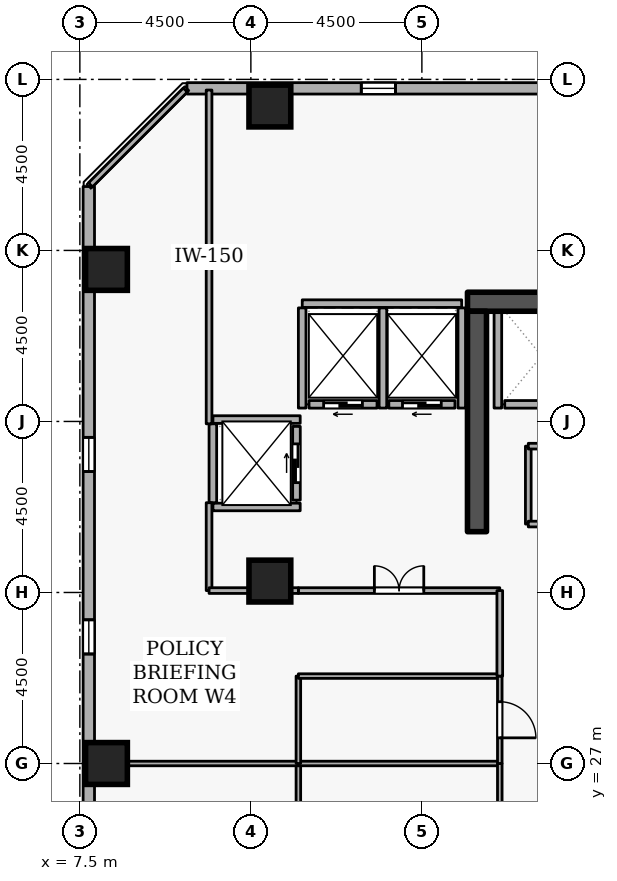
"""IFC4 building model, lengths in metres.
Left out: names, types, materials, properties, quantities, classifications, styles, units other than length and angle.
Written with IfcOpenShell. Run it as: python <this file> out.ifc"""

import sys

from ifc_helpers import new_model, si_unit, direction, frame, frame_2d, origin, origin_2d, place, context, subcontext, project, spatial, rectangle, extrude, element, fill, save


model = new_model("IFC4")
c1 = context("Model", 3, precision=1e-05, world=origin(), true_north=direction((0.0, 1.0)))
c2 = subcontext(c1, "Body", "Model", "MODEL_VIEW")
j1 = project(units=[si_unit("LENGTHUNIT", "METRE"), si_unit("PLANEANGLEUNIT", "RADIAN")], contexts=[c1])
p1 = place(None, origin())
s1 = spatial("IfcSite", under=j1, at=p1, CompositionType="ELEMENT")
p2 = place(p1, origin())
s2 = spatial("IfcBuilding", under=s1, at=p2, CompositionType="ELEMENT")
p3 = place(p2, frame((0.0, 0.0, 167.1)))
s3 = spatial("IfcBuildingStorey", under=s2, at=p3, CompositionType="ELEMENT", Elevation=167.1)
p4 = place(p3, frame((17.7, 39.15, 0.0), z_axis=(0.0, 0.0, 1.0), x_axis=(1.0, 0.0, 0.0)))
e1 = element("IfcWall", 1, at=p4, inside=s3, PredefinedType="SHEAR", context=c2, shape_type="SweptSolid", body=[
    extrude(rectangle(XDim=15.6, YDim=0.5, at=frame_2d((7.8, 0.0))), origin(), (0.0, 0.0, 1.0), 3.6),
])
p5 = place(p3, frame((17.95, 33.1, 0.0), z_axis=(0.0, 0.0, 1.0), x_axis=(0.0, 1.0, 0.0)))
e2 = element("IfcWall", 2, at=p5, inside=s3, PredefinedType="SHEAR", context=c2, shape_type="SweptSolid", body=[
    extrude(rectangle(XDim=5.8, YDim=0.5, at=frame_2d((2.9, 0.0))), origin(), (0.0, 0.0, 1.0), 3.6),
])
for number, where, z_axis, x_axis in (
    (3, (12.5, 44.3, 0.0), (0.0, 0.0, 1.0), (1.0, 0.0, 0.0)),
    (4, (8.2, 27.0, 0.0), (0.0, 0.0, 1.0), (1.0, 0.0, 0.0)),
    (5, (8.2, 40.0, 0.0), (0.0, 0.0, 1.0), (1.0, 0.0, 0.0)),
    (6, (12.5, 31.8, 0.0), (0.0, 0.0, 1.0), (1.0, 0.0, 0.0)),
):
    element("IfcColumn", number, at=place(p3, frame(where, z_axis=z_axis, x_axis=x_axis)), inside=s3, PredefinedType="COLUMN", context=c2, shape_type="SweptSolid", body=[
        extrude(rectangle(XDim=1.1, YDim=1.1, at=origin_2d()), origin(), (0.0, 0.0, 1.0), 3.6),
    ])
p6 = place(p3, frame((46.406, 44.764, 0.0), z_axis=(0.0, 0.0, 1.0), x_axis=(-0.999999999634, 2.7061402e-05, 0.0)))
e7 = element("IfcWall", 7, at=p6, inside=s3, PredefinedType="STANDARD", context=c2, shape_type="SweptSolid", body=[
    extrude(rectangle(XDim=36.087, YDim=0.3, at=frame_2d((18.043, 0.0))), origin(), (0.0, 0.0, 1.0), 2.7),
])
p7 = place(p6, frame((1.8, 0.0, 0.72)))
e8 = element("IfcOpeningElement", 8, at=p7, cuts=e7, PredefinedType="OPENING", context=c2, shape_type="SweptSolid", body=[
    extrude(rectangle(XDim=0.9, YDim=1.75, at=frame_2d((0.45, 0.875))), frame((0.0, 0.16, 0.0), z_axis=(0.0, -1.0, 0.0), x_axis=(1.0, 0.0, 0.0)), (0.0, 0.0, 1.0), 0.32),
])
p8 = place(p6, frame((11.4, 0.0, 0.72)))
e9 = element("IfcOpeningElement", 9, at=p8, cuts=e7, PredefinedType="OPENING", context=c2, shape_type="SweptSolid", body=[
    extrude(rectangle(XDim=0.9, YDim=1.75, at=frame_2d((0.45, 0.875))), frame((0.0, 0.16, 0.0), z_axis=(0.0, -1.0, 0.0), x_axis=(1.0, 0.0, 0.0)), (0.0, 0.0, 1.0), 0.32),
])
p9 = place(p6, frame((16.2, 0.0, 0.72)))
e10 = element("IfcOpeningElement", 10, at=p9, cuts=e7, PredefinedType="OPENING", context=c2, shape_type="SweptSolid", body=[
    extrude(rectangle(XDim=0.9, YDim=1.75, at=frame_2d((0.45, 0.875))), frame((0.0, 0.16, 0.0), z_axis=(0.0, -1.0, 0.0), x_axis=(1.0, 0.0, 0.0)), (0.0, 0.0, 1.0), 0.32),
])
p10 = place(p6, frame((25.8, 0.0, 0.72)))
e11 = element("IfcOpeningElement", 11, at=p10, cuts=e7, PredefinedType="OPENING", context=c2, shape_type="SweptSolid", body=[
    extrude(rectangle(XDim=0.9, YDim=1.75, at=frame_2d((0.45, 0.875))), frame((0.0, 0.16, 0.0), z_axis=(0.0, -1.0, 0.0), x_axis=(1.0, 0.0, 0.0)), (0.0, 0.0, 1.0), 0.32),
])
p11 = place(p6, frame((30.6, 0.0, 0.72)))
e12 = element("IfcOpeningElement", 12, at=p11, cuts=e7, PredefinedType="OPENING", context=c2, shape_type="SweptSolid", body=[
    extrude(rectangle(XDim=0.9, YDim=1.75, at=frame_2d((0.45, 0.875))), frame((0.0, 0.16, 0.0), z_axis=(0.0, -1.0, 0.0), x_axis=(1.0, 0.0, 0.0)), (0.0, 0.0, 1.0), 0.32),
])
p12 = place(p3, frame((7.735, 42.181, 0.0), z_axis=(0.0, 0.0, 1.0), x_axis=(2.7061402e-05, -0.999999999634, 0.0)))
e13 = element("IfcWall", 13, at=p12, inside=s3, PredefinedType="STANDARD", context=c2, shape_type="SweptSolid", body=[
    extrude(rectangle(XDim=36.087, YDim=0.3, at=frame_2d((18.043, 0.0))), origin(), (0.0, 0.0, 1.0), 2.7),
])
p13 = place(p12, frame((6.6, 0.0, 0.72)))
e14 = element("IfcOpeningElement", 14, at=p13, cuts=e13, PredefinedType="OPENING", context=c2, shape_type="SweptSolid", body=[
    extrude(rectangle(XDim=0.9, YDim=1.75, at=frame_2d((0.45, 0.875))), frame((0.0, 0.16, 0.0), z_axis=(0.0, -1.0, 0.0), x_axis=(1.0, 0.0, 0.0)), (0.0, 0.0, 1.0), 0.32),
])
p14 = place(p12, frame((11.4, 0.0, 0.72)))
e15 = element("IfcOpeningElement", 15, at=p14, cuts=e13, PredefinedType="OPENING", context=c2, shape_type="SweptSolid", body=[
    extrude(rectangle(XDim=0.9, YDim=1.75, at=frame_2d((0.45, 0.875))), frame((0.0, 0.16, 0.0), z_axis=(0.0, -1.0, 0.0), x_axis=(1.0, 0.0, 0.0)), (0.0, 0.0, 1.0), 0.32),
])
p15 = place(p12, frame((21.0, 0.0, 0.72)))
e16 = element("IfcOpeningElement", 16, at=p15, cuts=e13, PredefinedType="OPENING", context=c2, shape_type="SweptSolid", body=[
    extrude(rectangle(XDim=0.9, YDim=1.75, at=frame_2d((0.45, 0.875))), frame((0.0, 0.16, 0.0), z_axis=(0.0, -1.0, 0.0), x_axis=(1.0, 0.0, 0.0)), (0.0, 0.0, 1.0), 0.32),
])
p16 = place(p12, frame((25.8, 0.0, 0.72)))
e17 = element("IfcOpeningElement", 17, at=p16, cuts=e13, PredefinedType="OPENING", context=c2, shape_type="SweptSolid", body=[
    extrude(rectangle(XDim=0.9, YDim=1.75, at=frame_2d((0.45, 0.875))), frame((0.0, 0.16, 0.0), z_axis=(0.0, -1.0, 0.0), x_axis=(1.0, 0.0, 0.0)), (0.0, 0.0, 1.0), 0.32),
])
p17 = place(p12, frame((30.6, 0.0, 0.72)))
e18 = element("IfcOpeningElement", 18, at=p17, cuts=e13, PredefinedType="OPENING", context=c2, shape_type="SweptSolid", body=[
    extrude(rectangle(XDim=0.9, YDim=1.75, at=frame_2d((0.45, 0.875))), frame((0.0, 0.16, 0.0), z_axis=(0.0, -1.0, 0.0), x_axis=(1.0, 0.0, 0.0)), (0.0, 0.0, 1.0), 0.32),
])
p18 = place(p3, frame((20.62, 36.45, 0.0), z_axis=(0.0, 0.0, 1.0), x_axis=(-1.0, 0.0, 0.0)))
e19 = element("IfcWall", 19, at=p18, inside=s3, PredefinedType="STANDARD", context=c2, shape_type="SweptSolid", body=[
    extrude(rectangle(XDim=1.94, YDim=0.2, at=frame_2d((0.97, 0.0))), origin(), (0.0, 0.0, 1.0), 3.34),
])
p19 = place(p3, frame((17.37, 36.45, 0.0), z_axis=(0.0, 0.0, 1.0), x_axis=(-1.0, 0.0, 0.0)))
e20 = element("IfcWall", 20, at=p19, inside=s3, PredefinedType="STANDARD", context=c2, shape_type="SweptSolid", body=[
    extrude(rectangle(XDim=1.74, YDim=0.2, at=frame_2d((0.87, 0.0))), origin(), (0.0, 0.0, 1.0), 3.34),
])
p20 = place(p19, frame((0.36, 0.0, 0.0)))
e21 = element("IfcOpeningElement", 21, at=p20, cuts=e20, PredefinedType="OPENING", context=c2, shape_type="SweptSolid", body=[
    extrude(rectangle(XDim=1.02, YDim=2.06, at=frame_2d((0.51, 1.03))), frame((0.0, 0.11, 0.0), z_axis=(0.0, -1.0, 0.0), x_axis=(1.0, 0.0, 0.0)), (0.0, 0.0, 1.0), 0.22),
])
p21 = place(p3, frame((15.32, 36.45, 0.0), z_axis=(0.0, 0.0, 1.0), x_axis=(-1.0, 0.0, 0.0)))
e22 = element("IfcWall", 22, at=p21, inside=s3, PredefinedType="STANDARD", context=c2, shape_type="SweptSolid", body=[
    extrude(rectangle(XDim=1.79, YDim=0.2, at=frame_2d((0.895, 0.0))), origin(), (0.0, 0.0, 1.0), 3.34),
])
p22 = place(p21, frame((0.385, 0.0, 0.0)))
e23 = element("IfcOpeningElement", 23, at=p22, cuts=e22, PredefinedType="OPENING", context=c2, shape_type="SweptSolid", body=[
    extrude(rectangle(XDim=1.02, YDim=2.06, at=frame_2d((0.51, 1.03))), frame((0.0, 0.11, 0.0), z_axis=(0.0, -1.0, 0.0), x_axis=(1.0, 0.0, 0.0)), (0.0, 0.0, 1.0), 0.22),
])
p23 = place(p3, frame((13.2, 33.93, 0.0), z_axis=(0.0, 0.0, 1.0), x_axis=(0.0, 1.0, 0.0)))
e24 = element("IfcWall", 24, at=p23, inside=s3, PredefinedType="STANDARD", context=c2, shape_type="SweptSolid", body=[
    extrude(rectangle(XDim=1.94, YDim=0.2, at=frame_2d((0.97, 0.0))), origin(), (0.0, 0.0, 1.0), 3.34),
])
p24 = place(p23, frame((0.46, 0.0, 0.0)))
e25 = element("IfcOpeningElement", 25, at=p24, cuts=e24, PredefinedType="OPENING", context=c2, shape_type="SweptSolid", body=[
    extrude(rectangle(XDim=1.02, YDim=2.06, at=frame_2d((0.51, 1.03))), frame((0.0, 0.11, 0.0), z_axis=(0.0, -1.0, 0.0), x_axis=(1.0, 0.0, 0.0)), (0.0, 0.0, 1.0), 0.22),
])
p25 = place(p3, frame((18.5, 36.352, 0.0), z_axis=(0.0, 0.0, 1.0), x_axis=(0.0, 1.0, 0.0)))
e26 = element("IfcWall", 26, at=p25, inside=s3, PredefinedType="STANDARD", context=c2, shape_type="SweptSolid", body=[
    extrude(rectangle(XDim=2.536, YDim=0.2, at=frame_2d((1.268, 0.0))), origin(), (0.0, 0.0, 1.0), 3.34),
])
p26 = place(p3, frame((13.352, 39.1, 0.0), z_axis=(0.0, 0.0, 1.0), x_axis=(1.0, 0.0, 0.0)))
e27 = element("IfcWall", 27, at=p26, inside=s3, PredefinedType="STANDARD", context=c2, shape_type="SweptSolid", body=[
    extrude(rectangle(XDim=4.196, YDim=0.2, at=frame_2d((2.098, 0.0))), origin(), (0.0, 0.0, 1.0), 3.34),
])
p27 = place(p3, frame((17.55, 36.352, 0.0), z_axis=(0.0, 0.0, 1.0), x_axis=(0.0, 1.0, 0.0)))
e28 = element("IfcWall", 28, at=p27, inside=s3, PredefinedType="STANDARD", context=c2, shape_type="SweptSolid", body=[
    extrude(rectangle(XDim=2.636, YDim=0.2, at=frame_2d((1.318, 0.0))), origin(), (0.0, 0.0, 1.0), 2.545),
])
for number, where, z_axis, x_axis in (
    (29, (15.475, 36.352, 0.0), (0.0, 0.0, 1.0), (0.0, 1.0, 0.0)),
    (30, (13.35, 36.352, 0.0), (0.0, 0.0, 1.0), (0.0, 1.0, 0.0)),
):
    element("IfcWall", number, at=place(p3, frame(where, z_axis=z_axis, x_axis=x_axis)), inside=s3, PredefinedType="STANDARD", context=c2, shape_type="SweptSolid", body=[
        extrude(rectangle(XDim=2.636, YDim=0.2, at=frame_2d((1.318, 0.0))), origin(), (0.0, 0.0, 1.0), 3.34),
    ])
for number, where, z_axis, x_axis in (
    (31, (11.002, 36.05, 0.0), (0.0, 0.0, 1.0), (1.0, 0.0, 0.0)),
    (32, (11.002, 33.75, 0.0), (0.0, 0.0, 1.0), (1.0, 0.0, 0.0)),
):
    element("IfcWall", number, at=place(p3, frame(where, z_axis=z_axis, x_axis=x_axis)), inside=s3, PredefinedType="STANDARD", context=c2, shape_type="SweptSolid", body=[
        extrude(rectangle(XDim=2.296, YDim=0.2, at=frame_2d((1.148, 0.0))), origin(), (0.0, 0.0, 1.0), 3.34),
    ])
p28 = place(p3, frame((11.0, 33.862, 0.0), z_axis=(0.0, 0.0, 1.0), x_axis=(0.0, 1.0, 0.0)))
e33 = element("IfcWall", 33, at=p28, inside=s3, PredefinedType="STANDARD", context=c2, shape_type="SweptSolid", body=[
    extrude(rectangle(XDim=2.076, YDim=0.2, at=frame_2d((1.038, 0.0))), origin(), (0.0, 0.0, 1.0), 3.34),
])
p29 = place(p3, frame((19.3, 33.3, 0.0), z_axis=(0.0, 0.0, 1.0), x_axis=(0.0, 1.0, 0.0)))
e34 = element("IfcWall", 34, at=p29, inside=s3, PredefinedType="PARTITIONING", context=c2, shape_type="SweptSolid", body=[
    extrude(rectangle(XDim=2.05, YDim=0.15, at=frame_2d((1.025, 0.0))), origin(), (0.0, 0.0, 1.0), 3.34),
])
p30 = place(p3, frame((19.3, 35.35, 0.0), z_axis=(0.0, 0.0, 1.0), x_axis=(1.0, 0.0, 0.0)))
e35 = element("IfcWall", 35, at=p30, inside=s3, PredefinedType="PARTITIONING", context=c2, shape_type="SweptSolid", body=[
    extrude(rectangle(XDim=3.25, YDim=0.15, at=frame_2d((1.625, 0.0))), origin(), (0.0, 0.0, 1.0), 3.34),
])
p31 = place(p3, frame((22.55, 33.3, 0.0), z_axis=(0.0, 0.0, 1.0), x_axis=(-1.0, 0.0, 0.0)))
e36 = element("IfcWall", 36, at=p31, inside=s3, PredefinedType="PARTITIONING", context=c2, shape_type="SweptSolid", body=[
    extrude(rectangle(XDim=3.25, YDim=0.15, at=frame_2d((1.625, 0.0))), origin(), (0.0, 0.0, 1.0), 3.34),
])
p32 = place(p31, frame((1.165, 0.0, 0.0)))
e37 = element("IfcOpeningElement", 37, at=p32, cuts=e36, PredefinedType="OPENING", context=c2, shape_type="SweptSolid", body=[
    extrude(rectangle(XDim=0.92, YDim=2.08, at=frame_2d((0.46, 1.04))), frame((0.0, 0.085, 0.0), z_axis=(0.0, -1.0, 0.0), x_axis=(1.0, 0.0, 0.0)), (0.0, 0.0, 1.0), 0.17),
])
p33 = place(p3, frame((13.25, 27.0, 0.0), z_axis=(0.0, 0.0, 1.0), x_axis=(0.0, -1.0, 0.0)))
e38 = element("IfcWall", 38, at=p33, inside=s3, PredefinedType="PARTITIONING", context=c2, shape_type="SweptSolid", body=[
    extrude(rectangle(XDim=4.55, YDim=0.12, at=frame_2d((2.275, 0.0))), origin(), (0.0, 0.0, 1.0), 3.34),
])
p34 = place(p3, frame((7.78, 27.0, 0.0), z_axis=(0.0, 0.0, 1.0), x_axis=(1.0, 0.0, 0.0)))
e39 = element("IfcWall", 39, at=p34, inside=s3, PredefinedType="PARTITIONING", context=c2, shape_type="SweptSolid", body=[
    extrude(rectangle(XDim=5.47, YDim=0.12, at=frame_2d((2.735, 0.0))), origin(), (0.0, 0.0, 1.0), 2.882),
])
p35 = place(p3, frame((13.25, 27.0, 0.0), z_axis=(0.0, 0.0, 1.0), x_axis=(1.0, 0.0, 0.0)))
e40 = element("IfcWall", 40, at=p35, inside=s3, PredefinedType="PARTITIONING", context=c2, shape_type="SweptSolid", body=[
    extrude(rectangle(XDim=5.3, YDim=0.12, at=frame_2d((2.65, 0.0))), origin(), (0.0, 0.0, 1.0), 2.882),
])
p36 = place(p3, frame((18.55, 27.0, 0.0), z_axis=(0.0, 0.0, 1.0), x_axis=(0.0, -1.0, 0.0)))
e41 = element("IfcWall", 41, at=p36, inside=s3, PredefinedType="PARTITIONING", context=c2, shape_type="SweptSolid", body=[
    extrude(rectangle(XDim=4.55, YDim=0.12, at=frame_2d((2.275, 0.0))), origin(), (0.0, 0.0, 1.0), 3.34),
])
p37 = place(p3, frame((13.25, 27.0, 0.0), z_axis=(0.0, 0.0, 1.0), x_axis=(0.0, 1.0, 0.0)))
e42 = element("IfcWall", 42, at=p37, inside=s3, PredefinedType="PARTITIONING", context=c2, shape_type="SweptSolid", body=[
    extrude(rectangle(XDim=2.3, YDim=0.12, at=frame_2d((1.15, 0.0))), origin(), (0.0, 0.0, 1.0), 3.34),
])
p38 = place(p3, frame((13.25, 29.3, 0.0), z_axis=(0.0, 0.0, 1.0), x_axis=(1.0, 0.0, 0.0)))
e43 = element("IfcWall", 43, at=p38, inside=s3, PredefinedType="PARTITIONING", context=c2, shape_type="SweptSolid", body=[
    extrude(rectangle(XDim=5.3, YDim=0.12, at=frame_2d((2.65, 0.0))), origin(), (0.0, 0.0, 1.0), 3.34),
])
p39 = place(p3, frame((18.55, 29.3, 0.0), z_axis=(0.0, 0.0, 1.0), x_axis=(0.0, -1.0, 0.0)))
e44 = element("IfcWall", 44, at=p39, inside=s3, PredefinedType="PARTITIONING", context=c2, shape_type="SweptSolid", body=[
    extrude(rectangle(XDim=2.3, YDim=0.12, at=frame_2d((1.15, 0.0))), origin(), (0.0, 0.0, 1.0), 3.34),
])
p40 = place(p39, frame((0.675, 0.0, 0.0)))
e45 = element("IfcOpeningElement", 45, at=p40, cuts=e44, PredefinedType="OPENING", context=c2, shape_type="SweptSolid", body=[
    extrude(rectangle(XDim=0.95, YDim=2.1, at=frame_2d((0.475, 1.05))), frame((0.0, 0.07, 0.0), z_axis=(0.0, -1.0, 0.0), x_axis=(1.0, 0.0, 0.0)), (0.0, 0.0, 1.0), 0.14),
])
p41 = place(p3, frame((13.25, 31.55, 0.0), z_axis=(0.0, 0.0, 1.0), x_axis=(1.0, 0.0, 0.0)))
e46 = element("IfcWall", 46, at=p41, inside=s3, PredefinedType="PARTITIONING", context=c2, shape_type="SweptSolid", body=[
    extrude(rectangle(XDim=5.3, YDim=0.15, at=frame_2d((2.65, 0.0))), origin(), (0.0, 0.0, 1.0), 3.34),
])
p42 = place(p41, frame((2.0, 0.0, 0.0)))
e47 = element("IfcOpeningElement", 47, at=p42, cuts=e46, PredefinedType="OPENING", context=c2, shape_type="SweptSolid", body=[
    extrude(rectangle(XDim=1.3, YDim=2.12, at=frame_2d((0.65, 1.06))), frame((0.0, 0.085, 0.0), z_axis=(0.0, -1.0, 0.0), x_axis=(1.0, 0.0, 0.0)), (0.0, 0.0, 1.0), 0.17),
])
p43 = place(p3, frame((18.55, 31.55, 0.0), z_axis=(0.0, 0.0, 1.0), x_axis=(0.0, -1.0, 0.0)))
e48 = element("IfcWall", 48, at=p43, inside=s3, PredefinedType="PARTITIONING", context=c2, shape_type="SweptSolid", body=[
    extrude(rectangle(XDim=2.25, YDim=0.15, at=frame_2d((1.125, 0.0))), origin(), (0.0, 0.0, 1.0), 3.34),
])
p44 = place(p3, frame((7.78, 42.225, 0.0), z_axis=(0.0, 0.0, 1.0), x_axis=(0.707106781187, 0.707106781187, 0.0)))
e49 = element("IfcWall", 49, at=p44, inside=s3, PredefinedType="PARTITIONING", context=c2, shape_type="SweptSolid", body=[
    extrude(rectangle(XDim=3.528, YDim=0.15, at=frame_2d((1.764, 0.0))), origin(), (0.0, 0.0, 1.0), 3.34),
])
p45 = place(p3, frame((10.9, 44.72, 0.0), z_axis=(0.0, 0.0, 1.0), x_axis=(0.0, -1.0, 0.0)))
e50 = element("IfcWall", 50, at=p45, inside=s3, PredefinedType="PARTITIONING", context=c2, shape_type="SweptSolid", body=[
    extrude(rectangle(XDim=8.782, YDim=0.15, at=frame_2d((4.391, 0.0))), origin(), (0.0, 0.0, 1.0), 3.34),
])
p46 = place(p3, frame((10.9, 33.862, 0.0), z_axis=(0.0, 0.0, 1.0), x_axis=(0.0, -1.0, 0.0)))
e51 = element("IfcWall", 51, at=p46, inside=s3, PredefinedType="PARTITIONING", context=c2, shape_type="SweptSolid", body=[
    extrude(rectangle(XDim=2.312, YDim=0.15, at=frame_2d((1.156, 0.0))), origin(), (0.0, 0.0, 1.0), 3.34),
])
p47 = place(p3, frame((10.9, 31.55, 0.0), z_axis=(0.0, 0.0, 1.0), x_axis=(1.0, 0.0, 0.0)))
e52 = element("IfcWall", 52, at=p47, inside=s3, PredefinedType="PARTITIONING", context=c2, shape_type="SweptSolid", body=[
    extrude(rectangle(XDim=2.35, YDim=0.15, at=frame_2d((1.175, 0.0))), origin(), (0.0, 0.0, 1.0), 3.34),
])
p48 = place(p11, origin())
e53 = element("IfcWindow", 53, at=p48, inside=s3, PartitioningType="SINGLE_PANEL", PredefinedType="WINDOW", context=c2, shape_type="SweptSolid", body=[
    extrude(rectangle(XDim=0.9, YDim=1.75, at=frame_2d((0.45, 0.875))), frame((0.0, 0.03, 0.0), z_axis=(0.0, -1.0, 0.0), x_axis=(1.0, 0.0, 0.0)), (0.0, 0.0, 1.0), 0.06),
])
fill(e12, e53)
p49 = place(p13, origin())
e54 = element("IfcWindow", 54, at=p49, inside=s3, PartitioningType="SINGLE_PANEL", PredefinedType="WINDOW", context=c2, shape_type="SweptSolid", body=[
    extrude(rectangle(XDim=0.9, YDim=1.75, at=frame_2d((0.45, 0.875))), frame((0.0, 0.03, 0.0), z_axis=(0.0, -1.0, 0.0), x_axis=(1.0, 0.0, 0.0)), (0.0, 0.0, 1.0), 0.06),
])
fill(e14, e54)
p50 = place(p14, origin())
e55 = element("IfcWindow", 55, at=p50, inside=s3, PartitioningType="SINGLE_PANEL", PredefinedType="WINDOW", context=c2, shape_type="SweptSolid", body=[
    extrude(rectangle(XDim=0.9, YDim=1.75, at=frame_2d((0.45, 0.875))), frame((0.0, 0.03, 0.0), z_axis=(0.0, -1.0, 0.0), x_axis=(1.0, 0.0, 0.0)), (0.0, 0.0, 1.0), 0.06),
])
fill(e15, e55)
p51 = place(p20, origin())
e56 = element("IfcDoor", 56, at=p51, inside=s3, OperationType="SLIDING_TO_LEFT", PredefinedType="DOOR", context=c2, shape_type="SweptSolid", body=[
    extrude(rectangle(XDim=1.02, YDim=2.06, at=frame_2d((0.51, 1.03))), frame((0.0, 0.025, 0.0), z_axis=(0.0, -1.0, 0.0), x_axis=(1.0, 0.0, 0.0)), (0.0, 0.0, 1.0), 0.05),
])
fill(e21, e56)
p52 = place(p22, origin())
e57 = element("IfcDoor", 57, at=p52, inside=s3, OperationType="SLIDING_TO_LEFT", PredefinedType="DOOR", context=c2, shape_type="SweptSolid", body=[
    extrude(rectangle(XDim=1.02, YDim=2.06, at=frame_2d((0.51, 1.03))), frame((0.0, 0.025, 0.0), z_axis=(0.0, -1.0, 0.0), x_axis=(1.0, 0.0, 0.0)), (0.0, 0.0, 1.0), 0.05),
])
fill(e23, e57)
p53 = place(p24, origin())
e58 = element("IfcDoor", 58, at=p53, inside=s3, OperationType="SLIDING_TO_LEFT", PredefinedType="DOOR", context=c2, shape_type="SweptSolid", body=[
    extrude(rectangle(XDim=1.02, YDim=2.06, at=frame_2d((0.51, 1.03))), frame((0.0, 0.025, 0.0), z_axis=(0.0, -1.0, 0.0), x_axis=(1.0, 0.0, 0.0)), (0.0, 0.0, 1.0), 0.05),
])
fill(e25, e58)
p54 = place(p40, origin())
e59 = element("IfcDoor", 59, at=p54, inside=s3, OperationType="SINGLE_SWING_RIGHT", PredefinedType="DOOR", context=c2, shape_type="SweptSolid", body=[
    extrude(rectangle(XDim=0.95, YDim=2.1, at=frame_2d((0.475, 1.05))), frame((0.0, 0.025, 0.0), z_axis=(0.0, -1.0, 0.0), x_axis=(1.0, 0.0, 0.0)), (0.0, 0.0, 1.0), 0.05),
])
fill(e45, e59)
p55 = place(p42, origin())
e60 = element("IfcDoor", 60, at=p55, inside=s3, OperationType="DOUBLE_DOOR_SINGLE_SWING", PredefinedType="DOOR", context=c2, shape_type="SweptSolid", body=[
    extrude(rectangle(XDim=1.3, YDim=2.12, at=frame_2d((0.65, 1.06))), frame((0.0, 0.025, 0.0), z_axis=(0.0, -1.0, 0.0), x_axis=(1.0, 0.0, 0.0)), (0.0, 0.0, 1.0), 0.05),
])
fill(e47, e60)
save(model, sys.argv[1])
